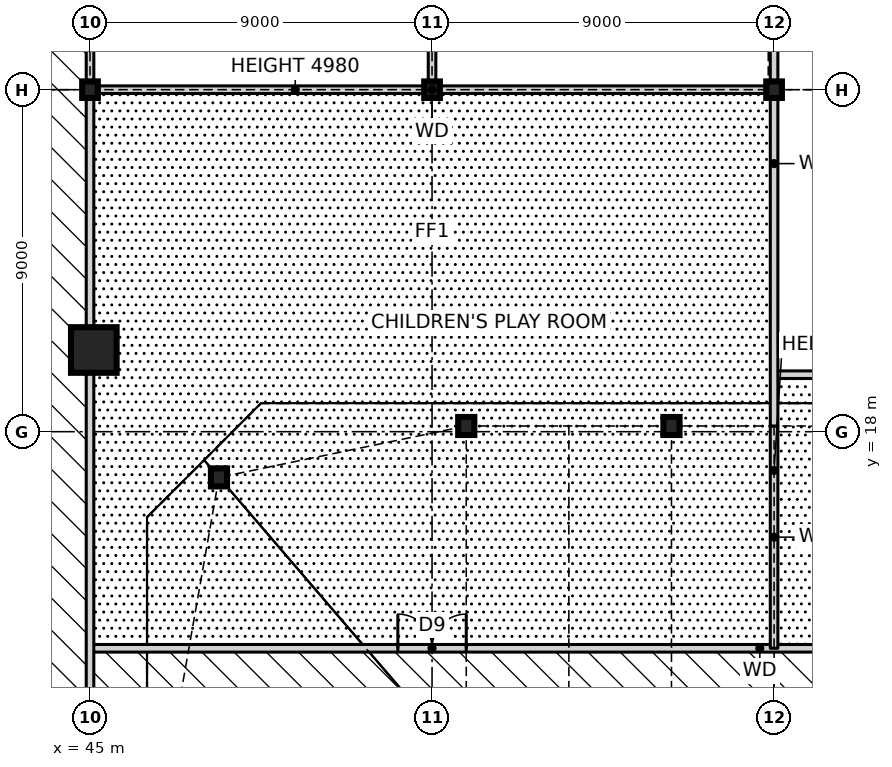
"""IFC4 building model, lengths in metres.
Left out: names, types, materials, properties, quantities, classifications, styles, units other than length and angle.
Written with IfcOpenShell. Run it as: python <this file> out.ifc"""

import sys

from ifc_helpers import new_model, si_unit, direction, frame, frame_2d, origin, origin_2d, place, context, subcontext, project, spatial, rectangle, hollow_rectangle, i_section, extrude, element, fill, save


model = new_model("IFC4")
c1 = context("Model", 3, precision=1e-05, world=origin(), true_north=direction((0.0, 1.0)))
c2 = subcontext(c1, "Body", "Model", "MODEL_VIEW")
j1 = project(units=[si_unit("LENGTHUNIT", "METRE"), si_unit("PLANEANGLEUNIT", "RADIAN")], contexts=[c1])
p1 = place(None, origin())
s1 = spatial("IfcSite", under=j1, at=p1, CompositionType="ELEMENT")
p2 = place(p1, origin())
s2 = spatial("IfcBuilding", under=s1, at=p2, CompositionType="ELEMENT")
p3 = place(p2, origin())
s3 = spatial("IfcBuildingStorey", under=s2, at=p3, CompositionType="ELEMENT", Elevation=0.0)
for number, where, z_axis, x_axis in (
    (1, (60.3, 18.15, 0.0), (0.0, 0.0, 1.0), (1.0, 0.0, 0.0)),
    (2, (54.9, 18.15, 0.0), (0.0, 0.0, 1.0), (1.0, 0.0, 0.0)),
    (3, (48.394, 16.797, 0.0), (0.0, 0.0, 1.0), (1.0, 0.0, 0.0)),
):
    element("IfcColumn", number, at=place(p3, frame(where, z_axis=z_axis, x_axis=x_axis)), inside=s3, PredefinedType="COLUMN", context=c2, shape_type="SweptSolid", body=[
        extrude(i_section(OverallWidth=0.424, OverallDepth=0.475, WebThickness=0.048, FlangeThickness=0.077, at=origin_2d()), origin(), (0.0, 0.0, 1.0), 6.0),
    ])
p4 = place(p3, frame((45.1, 20.15, 0.0), z_axis=(0.0, 0.0, 1.0), x_axis=(1.0, 0.0, 0.0)))
e4 = element("IfcColumn", 4, at=p4, inside=s3, PredefinedType="COLUMN", context=c2, shape_type="SweptSolid", body=[
    extrude(hollow_rectangle(XDim=1.2, YDim=1.2, WallThickness=0.07, at=origin_2d()), origin(), (0.0, 0.0, 1.0), 6.0),
])
for number, where, z_axis, x_axis in (
    (5, (45.0, 27.0, 0.0), (0.0, 0.0, 1.0), (1.0, 0.0, 0.0)),
    (6, (54.0, 27.0, 0.0), (0.0, 0.0, 1.0), (1.0, 0.0, 0.0)),
    (7, (63.0, 27.0, 0.0), (0.0, 0.0, 1.0), (1.0, 0.0, 0.0)),
):
    element("IfcColumn", number, at=place(p3, frame(where, z_axis=z_axis, x_axis=x_axis)), inside=s3, PredefinedType="COLUMN", context=c2, shape_type="SweptSolid", body=[
        extrude(i_section(OverallWidth=0.411, OverallDepth=0.434, WebThickness=0.036, FlangeThickness=0.057, at=origin_2d()), origin(), (0.0, 0.0, 1.0), 6.0),
    ])
p5 = place(p3, frame((45.0, 12.3, 0.0), z_axis=(0.0, 0.0, 1.0), x_axis=(1.0, 0.0, 0.0)))
e8 = element("IfcWall", 8, at=p5, inside=s3, PredefinedType="SOLIDWALL", context=c2, shape_type="SweptSolid", body=[
    extrude(rectangle(XDim=35.25, YDim=0.2, at=frame_2d((17.625, 0.0))), origin(), (0.0, 0.0, 1.0), 5.75),
])
p6 = place(p5, frame((8.1, 0.0, 0.0)))
e9 = element("IfcOpeningElement", 9, at=p6, cuts=e8, PredefinedType="OPENING", context=c2, shape_type="SweptSolid", body=[
    extrude(rectangle(XDim=1.8, YDim=2.1, at=frame_2d((0.9, 1.05))), frame((0.0, 0.11, 0.0), z_axis=(0.0, -1.0, 0.0), x_axis=(1.0, 0.0, 0.0)), (0.0, 0.0, 1.0), 0.22),
])
p7 = place(p5, frame((22.75, 0.0, 0.0)))
e10 = element("IfcOpeningElement", 10, at=p7, cuts=e8, PredefinedType="OPENING", context=c2, shape_type="SweptSolid", body=[
    extrude(rectangle(XDim=1.8, YDim=2.1, at=frame_2d((0.9, 1.05))), frame((0.0, 0.11, 0.0), z_axis=(0.0, -1.0, 0.0), x_axis=(1.0, 0.0, 0.0)), (0.0, 0.0, 1.0), 0.22),
])
p8 = place(p3, frame((63.0, 19.5, 0.0), z_axis=(0.0, 0.0, 1.0), x_axis=(1.0, 0.0, 0.0)))
e11 = element("IfcWall", 11, at=p8, inside=s3, PredefinedType="SOLIDWALL", context=c2, shape_type="SweptSolid", body=[
    extrude(rectangle(XDim=17.25, YDim=0.2, at=frame_2d((8.625, 0.0))), origin(), (0.0, 0.0, 1.0), 5.75),
])
p9 = place(p3, frame((45.0, 27.0, 0.0), z_axis=(0.0, 0.0, 1.0), x_axis=(1.0, 0.0, 0.0)))
e12 = element("IfcWall", 12, at=p9, inside=s3, PredefinedType="SOLIDWALL", context=c2, shape_type="SweptSolid", body=[
    extrude(rectangle(XDim=18.0, YDim=0.2, at=frame_2d((9.0, 0.0))), origin(), (0.0, 0.0, 1.0), 4.98),
])
p10 = place(p3, frame((63.0, 12.3, 0.0), z_axis=(0.0, 0.0, 1.0), x_axis=(0.0, 1.0, 0.0)))
e13 = element("IfcWall", 13, at=p10, inside=s3, PredefinedType="SOLIDWALL", context=c2, shape_type="SweptSolid", body=[
    extrude(rectangle(XDim=5.85, YDim=0.2, at=frame_2d((2.925, 0.0))), origin(), (0.0, 0.0, 1.0), 5.067),
])
p11 = place(p3, frame((54.0, 27.0, 0.0), z_axis=(0.0, 0.0, 1.0), x_axis=(0.0, 1.0, 0.0)))
e14 = element("IfcWall", 14, at=p11, inside=s3, PredefinedType="SOLIDWALL", context=c2, shape_type="SweptSolid", body=[
    extrude(rectangle(XDim=8.94, YDim=0.2, at=frame_2d((4.47, 0.0))), origin(), (0.0, 0.0, 1.0), 4.98),
])
p12 = place(p3, frame((63.0, 18.15, 0.0), z_axis=(0.0, 0.0, 1.0), x_axis=(0.0, 1.0, 0.0)))
e15 = element("IfcWall", 15, at=p12, inside=s3, PredefinedType="SOLIDWALL", context=c2, shape_type="SweptSolid", body=[
    extrude(rectangle(XDim=13.81, YDim=0.2, at=frame_2d((6.905, 0.0))), origin(), (0.0, 0.0, 1.0), 5.75),
])
p13 = place(p3, frame((45.0, -27.0, 0.0), z_axis=(0.0, 0.0, 1.0), x_axis=(0.0, 1.0, 0.0)))
e16 = element("IfcWall", 16, at=p13, inside=s3, PredefinedType="SOLIDWALL", context=c2, shape_type="SweptSolid", body=[
    extrude(rectangle(XDim=54.0, YDim=0.2, at=frame_2d((27.0, 0.0))), origin(), (0.0, 0.0, 1.0), 5.75),
])
p14 = place(p13, frame((18.75, 0.0, 0.0)))
e17 = element("IfcOpeningElement", 17, at=p14, cuts=e16, PredefinedType="OPENING", context=c2, shape_type="SweptSolid", body=[
    extrude(rectangle(XDim=1.8, YDim=2.4, at=frame_2d((0.9, 1.2))), frame((0.0, 0.11, 0.0), z_axis=(0.0, -1.0, 0.0), x_axis=(1.0, 0.0, 0.0)), (0.0, 0.0, 1.0), 0.22),
])
p15 = place(p3, frame((45.0, 27.0, 0.0), z_axis=(0.0, 0.0, 1.0), x_axis=(0.0, 1.0, 0.0)))
e18 = element("IfcWall", 18, at=p15, inside=s3, PredefinedType="SOLIDWALL", context=c2, shape_type="SweptSolid", body=[
    extrude(rectangle(XDim=8.94, YDim=0.2, at=frame_2d((4.47, 0.0))), origin(), (0.0, 0.0, 1.0), 4.98),
])
p16 = place(p6, origin())
e19 = element("IfcDoor", 19, at=p16, inside=s3, OperationType="DOUBLE_DOOR_SINGLE_SWING", PredefinedType="DOOR", context=c2, shape_type="SweptSolid", body=[
    extrude(rectangle(XDim=1.8, YDim=2.1, at=frame_2d((0.9, 1.05))), frame((0.0, 0.025, 0.0), z_axis=(0.0, -1.0, 0.0), x_axis=(1.0, 0.0, 0.0)), (0.0, 0.0, 1.0), 0.05),
])
fill(e9, e19)
save(model, sys.argv[1])
